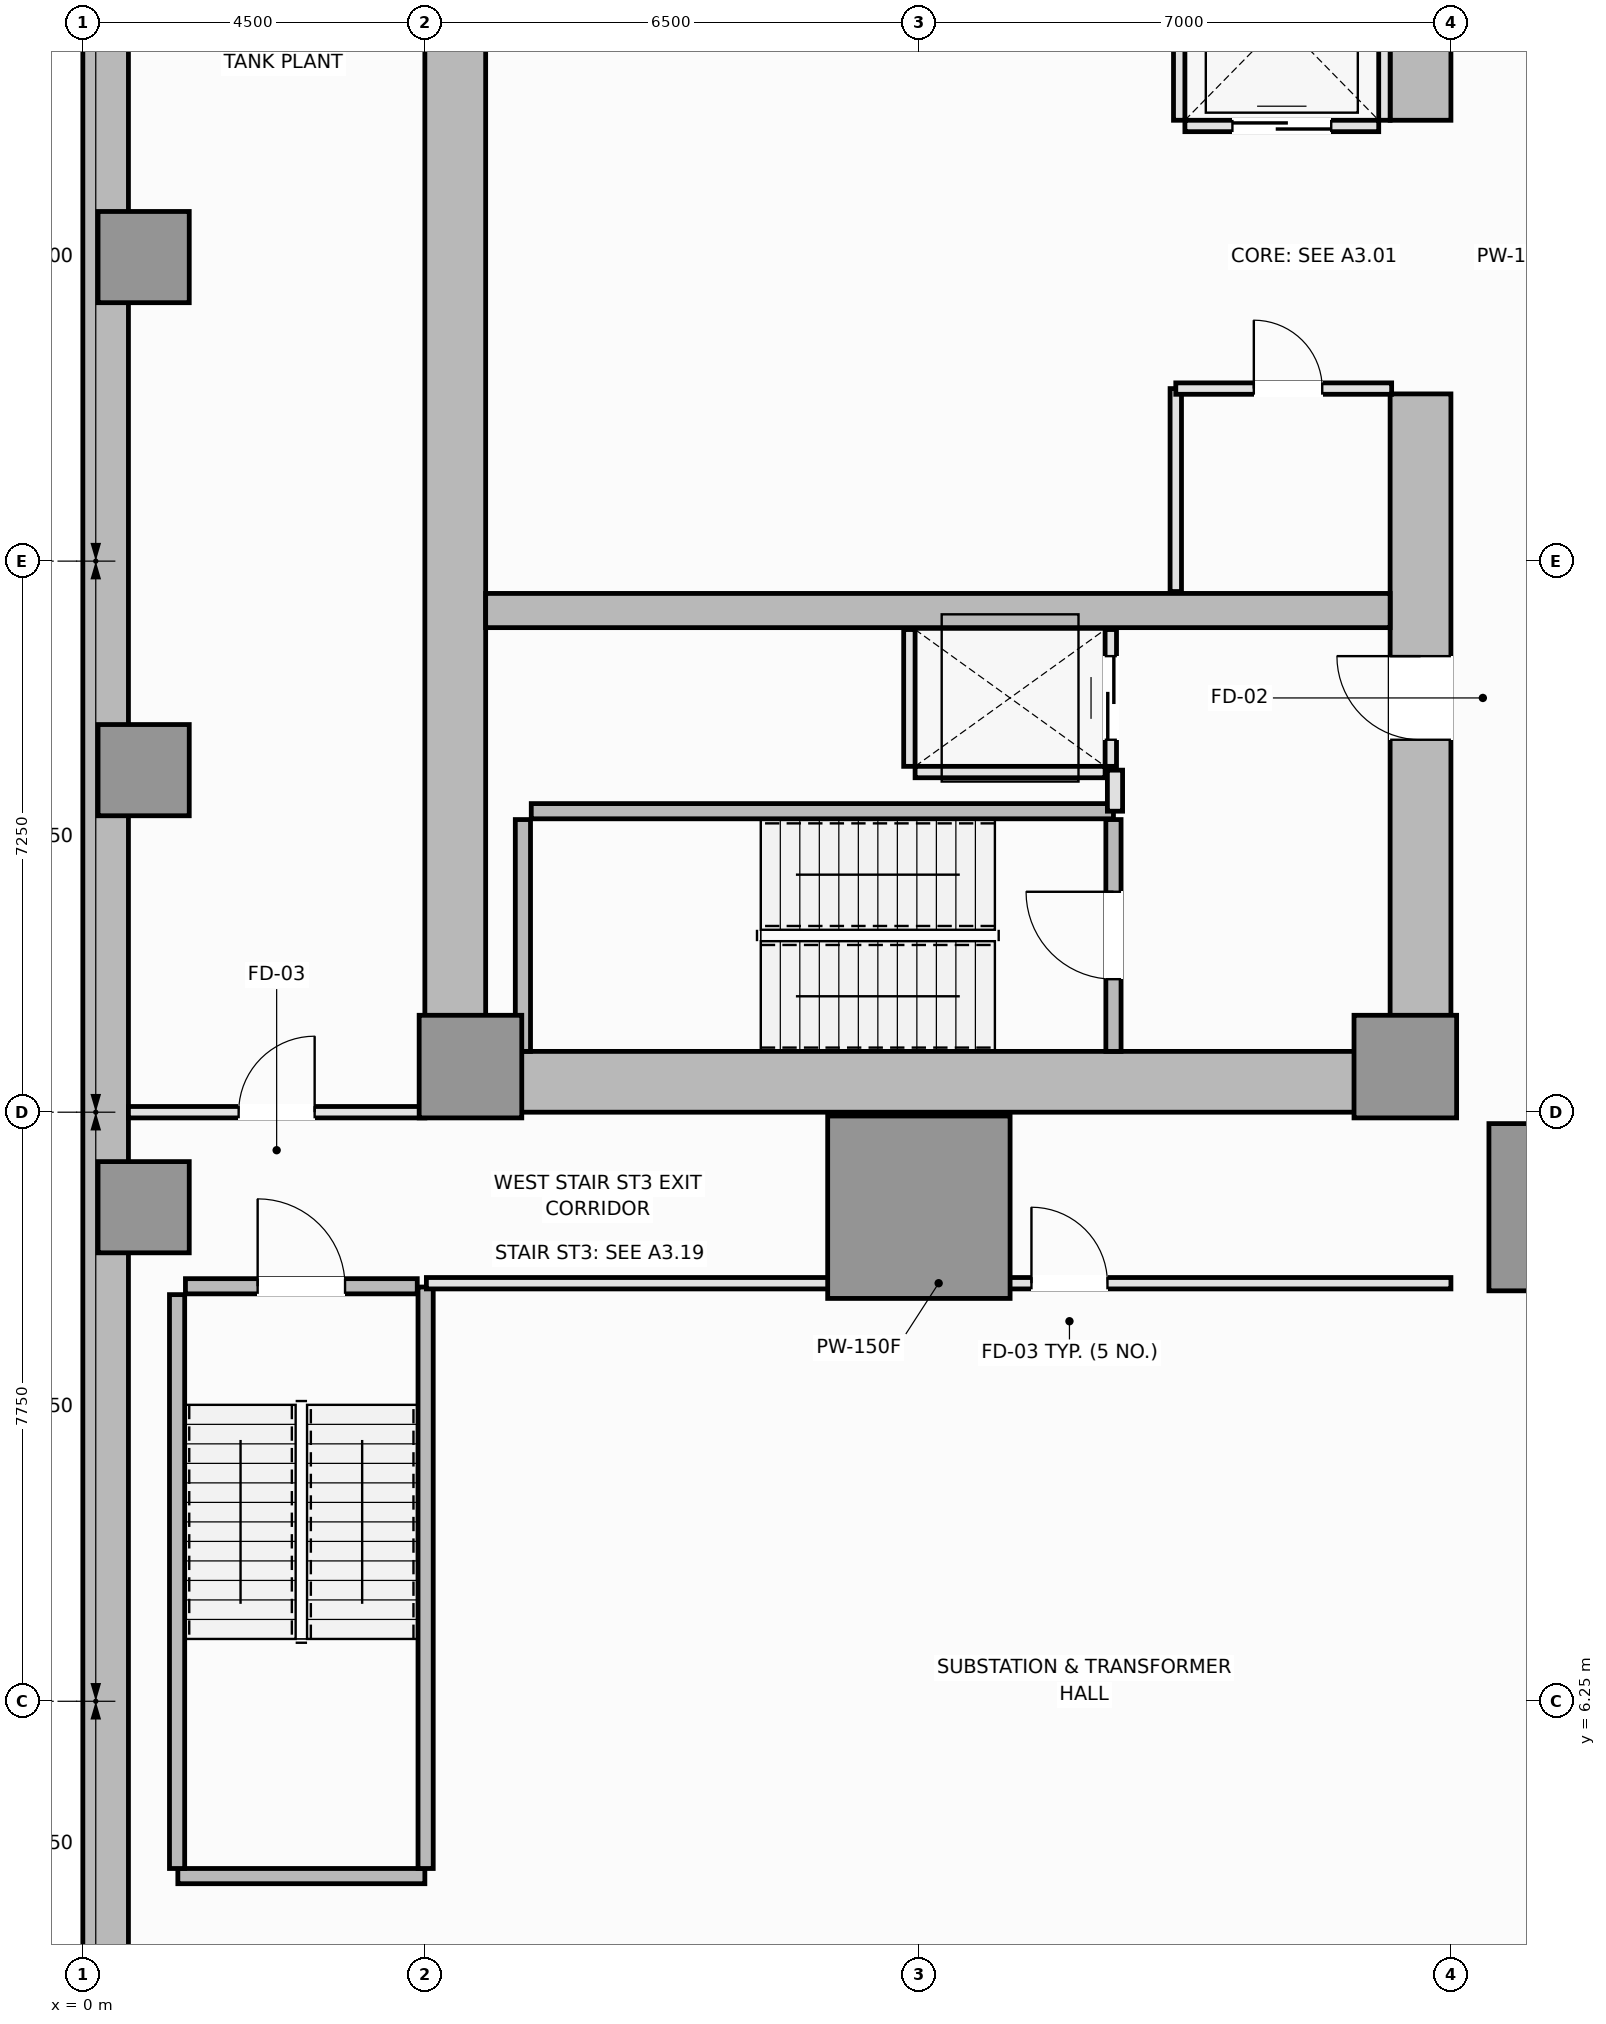
"""IFC4 building model, lengths in metres.
Left out: names, types, materials, properties, quantities, classifications, styles, units other than length and angle.
Written with IfcOpenShell. Run it as: python <this file> out.ifc"""

import sys

from ifc_helpers import new_model, si_unit, direction, frame, frame_2d, origin, origin_2d, place, context, subcontext, project, spatial, rectangle, extrude, element, fill, save


model = new_model("IFC4")
c1 = context("Model", 3, precision=1e-05, world=origin(), true_north=direction((0.0, 1.0)))
c2 = subcontext(c1, "Body", "Model", "MODEL_VIEW")
j1 = project(units=[si_unit("LENGTHUNIT", "METRE"), si_unit("PLANEANGLEUNIT", "RADIAN")], contexts=[c1])
p1 = place(None, origin())
s1 = spatial("IfcSite", under=j1, at=p1, CompositionType="ELEMENT")
p2 = place(p1, origin())
s2 = spatial("IfcBuilding", under=s1, at=p2, CompositionType="ELEMENT")
p3 = place(p2, frame((0.0, 0.0, -9.0)))
s3 = spatial("IfcBuildingStorey", under=s2, at=p3, CompositionType="ELEMENT", Elevation=-9.0)
p4 = place(p3, frame((0.3, 0.6, 0.0), z_axis=(0.0, 0.0, 1.0), x_axis=(0.0, 1.0, 0.0)))
e1 = element("IfcWall", 1, at=p4, inside=s3, PredefinedType="USERDEFINED", context=c2, shape_type="SweptSolid", body=[
    extrude(rectangle(XDim=49.3, YDim=0.6, at=frame_2d((24.65, 0.0))), origin(), (0.0, 0.0, 1.0), 4.2),
])
p5 = place(p3, frame((4.5, 14.4, 0.0), z_axis=(0.0, 0.0, 1.0), x_axis=(1.0, 0.0, 0.0)))
e2 = element("IfcWall", 2, at=p5, inside=s3, PredefinedType="SHEAR", context=c2, shape_type="SweptSolid", body=[
    extrude(rectangle(XDim=13.5, YDim=0.8, at=frame_2d((6.75, 0.0))), origin(), (0.0, 0.0, 1.0), 4.2),
])
p6 = place(p3, frame((4.9, 14.8, 0.0), z_axis=(0.0, 0.0, 1.0), x_axis=(0.0, 1.0, 0.0)))
e3 = element("IfcWall", 3, at=p6, inside=s3, PredefinedType="SHEAR", context=c2, shape_type="SweptSolid", body=[
    extrude(rectangle(XDim=20.9, YDim=0.8, at=frame_2d((10.45, 0.0))), origin(), (0.0, 0.0, 1.0), 4.2),
])
p7 = place(p3, frame((17.6, 14.8, 0.0), z_axis=(0.0, 0.0, 1.0), x_axis=(0.0, 1.0, 0.0)))
e4 = element("IfcWall", 4, at=p7, inside=s3, PredefinedType="SHEAR", context=c2, shape_type="SweptSolid", body=[
    extrude(rectangle(XDim=8.65, YDim=0.8, at=frame_2d((4.325, 0.0))), origin(), (0.0, 0.0, 1.0), 4.2),
])
p8 = place(p7, frame((4.1, 0.0, 0.0)))
e5 = element("IfcOpeningElement", 5, at=p8, cuts=e4, PredefinedType="OPENING", context=c2, shape_type="SweptSolid", body=[
    extrude(rectangle(XDim=1.1, YDim=2.15, at=frame_2d((0.55, 1.075))), frame((0.0, 0.41, 0.0), z_axis=(0.0, -1.0, 0.0), x_axis=(1.0, 0.0, 0.0)), (0.0, 0.0, 1.0), 0.82),
])
p9 = place(p3, frame((17.6, 27.05, 0.0), z_axis=(0.0, 0.0, 1.0), x_axis=(0.0, 1.0, 0.0)))
e6 = element("IfcWall", 6, at=p9, inside=s3, PredefinedType="SHEAR", context=c2, shape_type="SweptSolid", body=[
    extrude(rectangle(XDim=8.65, YDim=0.8, at=frame_2d((4.325, 0.0))), origin(), (0.0, 0.0, 1.0), 4.2),
])
p10 = place(p9, frame((3.45, 0.0, 0.0)))
e7 = element("IfcOpeningElement", 7, at=p10, cuts=e6, PredefinedType="OPENING", context=c2, shape_type="SweptSolid", body=[
    extrude(rectangle(XDim=1.1, YDim=2.15, at=frame_2d((0.55, 1.075))), frame((0.0, 0.41, 0.0), z_axis=(0.0, -1.0, 0.0), x_axis=(1.0, 0.0, 0.0)), (0.0, 0.0, 1.0), 0.82),
])
p11 = place(p3, frame((5.3, 20.6, 0.0), z_axis=(0.0, 0.0, 1.0), x_axis=(1.0, 0.0, 0.0)))
e8 = element("IfcWall", 8, at=p11, inside=s3, PredefinedType="SHEAR", context=c2, shape_type="SweptSolid", body=[
    extrude(rectangle(XDim=11.9, YDim=0.45, at=frame_2d((5.95, 0.0))), origin(), (0.0, 0.0, 1.0), 4.2),
])
for number, where, z_axis, x_axis in (
    (9, (5.1, 14.6, 0.0), (0.0, 0.0, 1.0), (1.0, 0.0, 0.0)),
    (10, (17.4, 14.6, 0.0), (0.0, 0.0, 1.0), (1.0, 0.0, 0.0)),
):
    element("IfcColumn", number, at=place(p3, frame(where, z_axis=z_axis, x_axis=x_axis)), inside=s3, PredefinedType="PILASTER", context=c2, shape_type="SweptSolid", body=[
        extrude(rectangle(XDim=1.35, YDim=1.35, at=origin_2d()), origin(), (0.0, 0.0, 1.0), 4.2),
    ])
p12 = place(p3, frame((11.0, 12.75, 0.0), z_axis=(0.0, 0.0, 1.0), x_axis=(1.0, 0.0, 0.0)))
e11 = element("IfcColumn", 11, at=p12, inside=s3, PredefinedType="COLUMN", context=c2, shape_type="SweptSolid", body=[
    extrude(rectangle(XDim=2.4, YDim=2.4, at=origin_2d()), origin(), (0.0, 0.0, 1.0), 4.2),
])
p13 = place(p3, frame((19.8, 12.75, 0.0), z_axis=(0.0, 0.0, 1.0), x_axis=(1.0, 0.0, 0.0)))
e12 = element("IfcColumn", 12, at=p13, inside=s3, PredefinedType="COLUMN", context=c2, shape_type="SweptSolid", body=[
    extrude(rectangle(XDim=2.6, YDim=2.2, at=origin_2d()), origin(), (0.0, 0.0, 1.0), 4.2),
])
for number, where, z_axis, x_axis in (
    (13, (0.8, 12.75, 0.0), (0.0, 0.0, 1.0), (1.0, 0.0, 0.0)),
    (14, (0.8, 18.5, 0.0), (0.0, 0.0, 1.0), (1.0, 0.0, 0.0)),
    (15, (0.8, 25.25, 0.0), (0.0, 0.0, 1.0), (1.0, 0.0, 0.0)),
):
    element("IfcColumn", number, at=place(p3, frame(where, z_axis=z_axis, x_axis=x_axis)), inside=s3, PredefinedType="COLUMN", context=c2, shape_type="SweptSolid", body=[
        extrude(rectangle(XDim=1.2, YDim=1.2, at=origin_2d()), origin(), (0.0, 0.0, 1.0), 4.2),
    ])
p14 = place(p3, frame((5.79, 14.8, 0.0), z_axis=(0.0, 0.0, 1.0), x_axis=(0.0, 1.0, 0.0)))
e16 = element("IfcWall", 16, at=p14, inside=s3, PredefinedType="SOLIDWALL", context=c2, shape_type="SweptSolid", body=[
    extrude(rectangle(XDim=3.05, YDim=0.2, at=frame_2d((1.525, 0.0))), origin(), (0.0, 0.0, 1.0), 4.2),
])
p15 = place(p3, frame((5.9, 17.96, 0.0), z_axis=(0.0, 0.0, 1.0), x_axis=(1.0, 0.0, 0.0)))
e17 = element("IfcWall", 17, at=p15, inside=s3, PredefinedType="SOLIDWALL", context=c2, shape_type="SweptSolid", body=[
    extrude(rectangle(XDim=7.66, YDim=0.2, at=frame_2d((3.83, 0.0))), origin(), (0.0, 0.0, 1.0), 4.2),
])
p16 = place(p3, frame((13.56, 14.8, 0.0), z_axis=(0.0, 0.0, 1.0), x_axis=(0.0, 1.0, 0.0)))
e18 = element("IfcWall", 18, at=p16, inside=s3, PredefinedType="SOLIDWALL", context=c2, shape_type="SweptSolid", body=[
    extrude(rectangle(XDim=3.05, YDim=0.2, at=frame_2d((1.525, 0.0))), origin(), (0.0, 0.0, 1.0), 4.2),
])
p17 = place(p16, frame((0.95, 0.0, 0.0)))
e19 = element("IfcOpeningElement", 19, at=p17, cuts=e18, PredefinedType="OPENING", context=c2, shape_type="SweptSolid", body=[
    extrude(rectangle(XDim=1.15, YDim=2.15, at=frame_2d((0.575, 1.075))), frame((0.0, 0.11, 0.0), z_axis=(0.0, -1.0, 0.0), x_axis=(1.0, 0.0, 0.0)), (0.0, 0.0, 1.0), 0.22),
])
p18 = place(p3, frame((1.25, 3.95, 0.0), z_axis=(0.0, 0.0, 1.0), x_axis=(1.0, 0.0, 0.0)))
e20 = element("IfcWall", 20, at=p18, inside=s3, PredefinedType="SOLIDWALL", context=c2, shape_type="SweptSolid", body=[
    extrude(rectangle(XDim=3.25, YDim=0.2, at=frame_2d((1.625, 0.0))), origin(), (0.0, 0.0, 1.0), 4.2),
])
p19 = place(p3, frame((1.24, 4.05, 0.0), z_axis=(0.0, 0.0, 1.0), x_axis=(0.0, 1.0, 0.0)))
e21 = element("IfcWall", 21, at=p19, inside=s3, PredefinedType="SOLIDWALL", context=c2, shape_type="SweptSolid", body=[
    extrude(rectangle(XDim=7.55, YDim=0.2, at=frame_2d((3.775, 0.0))), origin(), (0.0, 0.0, 1.0), 4.2),
])
p20 = place(p3, frame((4.51, 4.05, 0.0), z_axis=(0.0, 0.0, 1.0), x_axis=(0.0, 1.0, 0.0)))
e22 = element("IfcWall", 22, at=p20, inside=s3, PredefinedType="SOLIDWALL", context=c2, shape_type="SweptSolid", body=[
    extrude(rectangle(XDim=7.65, YDim=0.2, at=frame_2d((3.825, 0.0))), origin(), (0.0, 0.0, 1.0), 4.2),
])
p21 = place(p3, frame((1.35, 11.71, 0.0), z_axis=(0.0, 0.0, 1.0), x_axis=(1.0, 0.0, 0.0)))
e23 = element("IfcWall", 23, at=p21, inside=s3, PredefinedType="SOLIDWALL", context=c2, shape_type="SweptSolid", body=[
    extrude(rectangle(XDim=3.05, YDim=0.2, at=frame_2d((1.525, 0.0))), origin(), (0.0, 0.0, 1.0), 4.2),
])
p22 = place(p21, frame((0.95, 0.0, 0.0)))
e24 = element("IfcOpeningElement", 24, at=p22, cuts=e23, PredefinedType="OPENING", context=c2, shape_type="SweptSolid", body=[
    extrude(rectangle(XDim=1.15, YDim=2.15, at=frame_2d((0.575, 1.075))), frame((0.0, 0.11, 0.0), z_axis=(0.0, -1.0, 0.0), x_axis=(1.0, 0.0, 0.0)), (0.0, 0.0, 1.0), 0.22),
])
p23 = place(p3, frame((14.5, 26.975, 0.0), z_axis=(0.0, 0.0, 1.0), x_axis=(1.0, 0.0, 0.0)))
e25 = element("IfcWall", 25, at=p23, inside=s3, PredefinedType="PARTITIONING", context=c2, shape_type="SweptSolid", body=[
    extrude(rectangle(XDim=2.55, YDim=0.15, at=frame_2d((1.275, 0.0))), origin(), (0.0, 0.0, 1.0), 4.0),
])
p24 = place(p23, frame((0.625, 0.0, 0.0)))
e26 = element("IfcOpeningElement", 26, at=p24, cuts=e25, PredefinedType="OPENING", context=c2, shape_type="SweptSolid", body=[
    extrude(rectangle(XDim=1.3, YDim=2.2, at=frame_2d((0.65, 1.1))), frame((0.0, 0.085, 0.0), z_axis=(0.0, -1.0, 0.0), x_axis=(1.0, 0.0, 0.0)), (0.0, 0.0, 1.0), 0.17),
])
for number, where, z_axis, x_axis in (
    (27, (14.425, 27.05, 0.0), (0.0, 0.0, 1.0), (0.0, 1.0, 0.0)),
    (28, (17.125, 27.05, 0.0), (0.0, 0.0, 1.0), (0.0, 1.0, 0.0)),
):
    element("IfcWall", number, at=place(p3, frame(where, z_axis=z_axis, x_axis=x_axis)), inside=s3, PredefinedType="PARTITIONING", context=c2, shape_type="SweptSolid", body=[
        extrude(rectangle(XDim=2.6, YDim=0.15, at=frame_2d((1.3, 0.0))), origin(), (0.0, 0.0, 1.0), 4.0),
    ])
p25 = place(p3, frame((10.95, 18.475, 0.0), z_axis=(0.0, 0.0, 1.0), x_axis=(1.0, 0.0, 0.0)))
e29 = element("IfcWall", 29, at=p25, inside=s3, PredefinedType="PARTITIONING", context=c2, shape_type="SweptSolid", body=[
    extrude(rectangle(XDim=2.5, YDim=0.15, at=frame_2d((1.25, 0.0))), origin(), (0.0, 0.0, 1.0), 4.0),
])
p26 = place(p3, frame((10.875, 18.55, 0.0), z_axis=(0.0, 0.0, 1.0), x_axis=(0.0, 1.0, 0.0)))
e30 = element("IfcWall", 30, at=p26, inside=s3, PredefinedType="PARTITIONING", context=c2, shape_type="SweptSolid", body=[
    extrude(rectangle(XDim=1.8, YDim=0.15, at=frame_2d((0.9, 0.0))), origin(), (0.0, 0.0, 1.0), 4.0),
])
p27 = place(p3, frame((13.525, 18.55, 0.0), z_axis=(0.0, 0.0, 1.0), x_axis=(0.0, 1.0, 0.0)))
e31 = element("IfcWall", 31, at=p27, inside=s3, PredefinedType="PARTITIONING", context=c2, shape_type="SweptSolid", body=[
    extrude(rectangle(XDim=1.8, YDim=0.15, at=frame_2d((0.9, 0.0))), origin(), (0.0, 0.0, 1.0), 4.0),
])
p28 = place(p27, frame((0.35, 0.0, 0.0)))
e32 = element("IfcOpeningElement", 32, at=p28, cuts=e31, PredefinedType="OPENING", context=c2, shape_type="SweptSolid", body=[
    extrude(rectangle(XDim=1.1, YDim=2.2, at=frame_2d((0.55, 1.1))), frame((0.0, 0.085, 0.0), z_axis=(0.0, -1.0, 0.0), x_axis=(1.0, 0.0, 0.0)), (0.0, 0.0, 1.0), 0.17),
])
p29 = place(p3, frame((13.58, 17.96, 0.0), z_axis=(0.0, 0.0, 1.0), x_axis=(0.0, 1.0, 0.0)))
e33 = element("IfcWall", 33, at=p29, inside=s3, PredefinedType="PARTITIONING", context=c2, shape_type="SweptSolid", body=[
    extrude(rectangle(XDim=0.54, YDim=0.2, at=frame_2d((0.27, 0.0))), origin(), (0.0, 0.0, 1.0), 4.0),
])
p30 = place(p3, frame((14.38, 20.85, 0.0), z_axis=(0.0, 0.0, 1.0), x_axis=(0.0, 1.0, 0.0)))
e34 = element("IfcWall", 34, at=p30, inside=s3, PredefinedType="PARTITIONING", context=c2, shape_type="SweptSolid", body=[
    extrude(rectangle(XDim=2.67, YDim=0.15, at=frame_2d((1.335, 0.0))), origin(), (0.0, 0.0, 1.0), 4.0),
])
p31 = place(p3, frame((14.38, 23.52, 0.0), z_axis=(0.0, 0.0, 1.0), x_axis=(1.0, 0.0, 0.0)))
e35 = element("IfcWall", 35, at=p31, inside=s3, PredefinedType="PARTITIONING", context=c2, shape_type="SweptSolid", body=[
    extrude(rectangle(XDim=2.84, YDim=0.15, at=frame_2d((1.42, 0.0))), origin(), (0.0, 0.0, 1.0), 4.0),
])
p32 = place(p31, frame((1.027, 0.0, 0.0)))
e36 = element("IfcOpeningElement", 36, at=p32, cuts=e35, PredefinedType="OPENING", context=c2, shape_type="SweptSolid", body=[
    extrude(rectangle(XDim=0.9, YDim=2.1, at=frame_2d((0.45, 1.05))), frame((0.0, 0.085, 0.0), z_axis=(0.0, -1.0, 0.0), x_axis=(1.0, 0.0, 0.0)), (0.0, 0.0, 1.0), 0.17),
])
p33 = place(p3, frame((4.52, 11.75, 0.0), z_axis=(0.0, 0.0, 1.0), x_axis=(1.0, 0.0, 0.0)))
e37 = element("IfcWall", 37, at=p33, inside=s3, PredefinedType="PARTITIONING", context=c2, shape_type="SweptSolid", body=[
    extrude(rectangle(XDim=13.48, YDim=0.15, at=frame_2d((6.74, 0.0))), origin(), (0.0, 0.0, 1.0), 4.0),
])
p34 = place(p33, frame((7.961, 0.0, 0.0)))
e38 = element("IfcOpeningElement", 38, at=p34, cuts=e37, PredefinedType="OPENING", context=c2, shape_type="SweptSolid", body=[
    extrude(rectangle(XDim=1.0, YDim=2.15, at=frame_2d((0.5, 1.075))), frame((0.0, 0.085, 0.0), z_axis=(0.0, -1.0, 0.0), x_axis=(1.0, 0.0, 0.0)), (0.0, 0.0, 1.0), 0.17),
])
p35 = place(p3, frame((0.6, 14.0, 0.0), z_axis=(0.0, 0.0, 1.0), x_axis=(1.0, 0.0, 0.0)))
e39 = element("IfcWall", 39, at=p35, inside=s3, PredefinedType="PARTITIONING", context=c2, shape_type="SweptSolid", body=[
    extrude(rectangle(XDim=3.9, YDim=0.15, at=frame_2d((1.95, 0.0))), origin(), (0.0, 0.0, 1.0), 4.0),
])
p36 = place(p35, frame((1.45, 0.0, 0.0)))
e40 = element("IfcOpeningElement", 40, at=p36, cuts=e39, PredefinedType="OPENING", context=c2, shape_type="SweptSolid", body=[
    extrude(rectangle(XDim=1.0, YDim=2.15, at=frame_2d((0.5, 1.075))), frame((0.0, 0.085, 0.0), z_axis=(0.0, -1.0, 0.0), x_axis=(1.0, 0.0, 0.0)), (0.0, 0.0, 1.0), 0.17),
])
p37 = place(p17, origin())
e41 = element("IfcDoor", 41, at=p37, inside=s3, OperationType="SINGLE_SWING_RIGHT", PredefinedType="DOOR", context=c2, shape_type="SweptSolid", body=[
    extrude(rectangle(XDim=1.15, YDim=2.15, at=frame_2d((0.575, 1.075))), frame((0.0, 0.025, 0.0), z_axis=(0.0, -1.0, 0.0), x_axis=(1.0, 0.0, 0.0)), (0.0, 0.0, 1.0), 0.05),
])
fill(e19, e41)
p38 = place(p22, origin())
e42 = element("IfcDoor", 42, at=p38, inside=s3, OperationType="SINGLE_SWING_LEFT", PredefinedType="DOOR", context=c2, shape_type="SweptSolid", body=[
    extrude(rectangle(XDim=1.15, YDim=2.15, at=frame_2d((0.575, 1.075))), frame((0.0, 0.025, 0.0), z_axis=(0.0, -1.0, 0.0), x_axis=(1.0, 0.0, 0.0)), (0.0, 0.0, 1.0), 0.05),
])
fill(e24, e42)
p39 = place(p24, origin())
e43 = element("IfcDoor", 43, at=p39, inside=s3, OperationType="DOUBLE_DOOR_SLIDING", PredefinedType="DOOR", context=c2, shape_type="SweptSolid", body=[
    extrude(rectangle(XDim=1.3, YDim=2.2, at=frame_2d((0.65, 1.1))), frame((0.0, 0.025, 0.0), z_axis=(0.0, -1.0, 0.0), x_axis=(1.0, 0.0, 0.0)), (0.0, 0.0, 1.0), 0.05),
])
fill(e26, e43)
p40 = place(p28, origin())
e44 = element("IfcDoor", 44, at=p40, inside=s3, OperationType="DOUBLE_DOOR_SLIDING", PredefinedType="DOOR", context=c2, shape_type="SweptSolid", body=[
    extrude(rectangle(XDim=1.1, YDim=2.2, at=frame_2d((0.55, 1.1))), frame((0.0, 0.025, 0.0), z_axis=(0.0, -1.0, 0.0), x_axis=(1.0, 0.0, 0.0)), (0.0, 0.0, 1.0), 0.05),
])
fill(e32, e44)
p41 = place(p8, origin())
e45 = element("IfcDoor", 45, at=p41, inside=s3, OperationType="SINGLE_SWING_RIGHT", PredefinedType="DOOR", context=c2, shape_type="SweptSolid", body=[
    extrude(rectangle(XDim=1.1, YDim=2.15, at=frame_2d((0.55, 1.075))), frame((0.0, 0.025, 0.0), z_axis=(0.0, -1.0, 0.0), x_axis=(1.0, 0.0, 0.0)), (0.0, 0.0, 1.0), 0.05),
])
fill(e5, e45)
p42 = place(p32, origin())
e46 = element("IfcDoor", 46, at=p42, inside=s3, OperationType="SINGLE_SWING_LEFT", PredefinedType="DOOR", context=c2, shape_type="SweptSolid", body=[
    extrude(rectangle(XDim=0.9, YDim=2.1, at=frame_2d((0.45, 1.05))), frame((0.0, 0.025, 0.0), z_axis=(0.0, -1.0, 0.0), x_axis=(1.0, 0.0, 0.0)), (0.0, 0.0, 1.0), 0.05),
])
fill(e36, e46)
p43 = place(p34, origin())
e47 = element("IfcDoor", 47, at=p43, inside=s3, OperationType="SINGLE_SWING_LEFT", PredefinedType="DOOR", context=c2, shape_type="SweptSolid", body=[
    extrude(rectangle(XDim=1.0, YDim=2.15, at=frame_2d((0.5, 1.075))), frame((0.0, 0.025, 0.0), z_axis=(0.0, -1.0, 0.0), x_axis=(1.0, 0.0, 0.0)), (0.0, 0.0, 1.0), 0.05),
])
fill(e38, e47)
p44 = place(p36, origin())
e48 = element("IfcDoor", 48, at=p44, inside=s3, OperationType="SINGLE_SWING_RIGHT", PredefinedType="DOOR", context=c2, shape_type="SweptSolid", body=[
    extrude(rectangle(XDim=1.0, YDim=2.15, at=frame_2d((0.5, 1.075))), frame((0.0, 0.025, 0.0), z_axis=(0.0, -1.0, 0.0), x_axis=(1.0, 0.0, 0.0)), (0.0, 0.0, 1.0), 0.05),
])
fill(e40, e48)
save(model, sys.argv[1])
